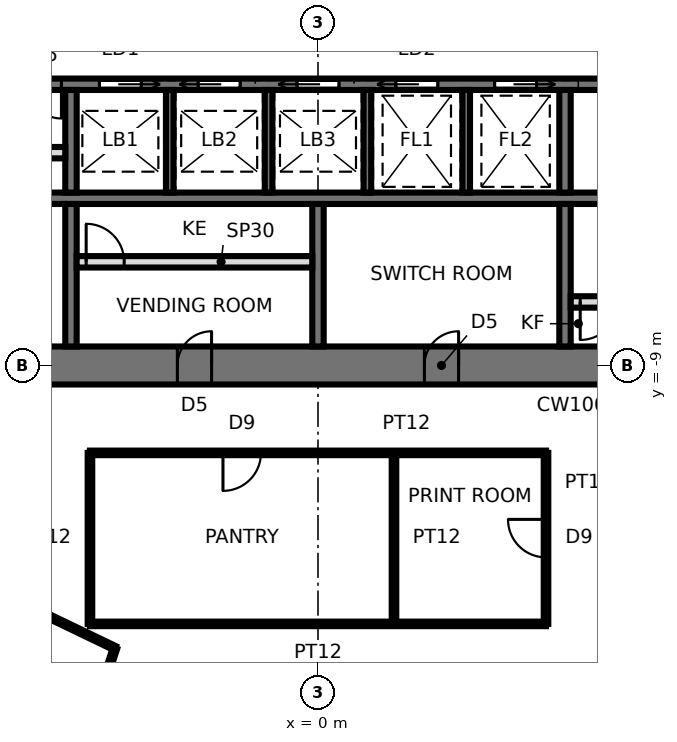
"""IFC4 building model, lengths in metres.
Left out: names, types, materials, properties, quantities, classifications, styles, units other than length and angle.
Written with IfcOpenShell. Run it as: python <this file> out.ifc"""

import sys

from ifc_helpers import new_model, si_unit, direction, frame, frame_2d, origin, place, context, subcontext, project, spatial, rectangle, extrude, element, fill, save


model = new_model("IFC4")
c1 = context("Model", 3, precision=1e-05, world=origin(), true_north=direction((0.0, 1.0)))
c2 = subcontext(c1, "Body", "Model", "MODEL_VIEW")
j1 = project(units=[si_unit("LENGTHUNIT", "METRE"), si_unit("PLANEANGLEUNIT", "RADIAN")], contexts=[c1])
p1 = place(None, origin())
s1 = spatial("IfcSite", under=j1, at=p1, CompositionType="ELEMENT")
p2 = place(p1, origin())
s2 = spatial("IfcBuilding", under=s1, at=p2, CompositionType="ELEMENT")
p3 = place(p2, frame((0.0, 0.0, 154.8)))
s3 = spatial("IfcBuildingStorey", under=s2, at=p3, CompositionType="ELEMENT", Elevation=154.8)
p4 = place(p3, frame((-13.2, -9.0, 0.0), z_axis=(0.0, 0.0, 1.0), x_axis=(1.0, 0.0, 0.0)))
e1 = element("IfcWall", 1, at=p4, inside=s3, PredefinedType="SHEAR", context=c2, shape_type="SweptSolid", body=[
    extrude(rectangle(XDim=26.4, YDim=1.0, at=frame_2d((13.2, 0.0))), origin(), (0.0, 0.0, 1.0), 3.9),
])
p5 = place(p4, frame((2.65, 0.0, 0.0)))
e2 = element("IfcOpeningElement", 2, at=p5, cuts=e1, PredefinedType="OPENING", context=c2, shape_type="SweptSolid", body=[
    extrude(rectangle(XDim=0.9, YDim=2.1, at=frame_2d((0.45, 1.05))), frame((0.0, 0.51, 0.0), z_axis=(0.0, -1.0, 0.0), x_axis=(1.0, 0.0, 0.0)), (0.0, 0.0, 1.0), 1.02),
])
p6 = place(p4, frame((9.5, 0.0, 0.0)))
e3 = element("IfcOpeningElement", 3, at=p6, cuts=e1, PredefinedType="OPENING", context=c2, shape_type="SweptSolid", body=[
    extrude(rectangle(XDim=0.9, YDim=2.1, at=frame_2d((0.45, 1.05))), frame((0.0, 0.51, 0.0), z_axis=(0.0, -1.0, 0.0), x_axis=(1.0, 0.0, 0.0)), (0.0, 0.0, 1.0), 1.02),
])
p7 = place(p4, frame((16.0, 0.0, 0.0)))
e4 = element("IfcOpeningElement", 4, at=p7, cuts=e1, PredefinedType="OPENING", context=c2, shape_type="SweptSolid", body=[
    extrude(rectangle(XDim=0.9, YDim=2.1, at=frame_2d((0.45, 1.05))), frame((0.0, 0.51, 0.0), z_axis=(0.0, -1.0, 0.0), x_axis=(1.0, 0.0, 0.0)), (0.0, 0.0, 1.0), 1.02),
])
p8 = place(p4, frame((22.85, 0.0, 0.0)))
e5 = element("IfcOpeningElement", 5, at=p8, cuts=e1, PredefinedType="OPENING", context=c2, shape_type="SweptSolid", body=[
    extrude(rectangle(XDim=0.9, YDim=2.1, at=frame_2d((0.45, 1.05))), frame((0.0, 0.51, 0.0), z_axis=(0.0, -1.0, 0.0), x_axis=(1.0, 0.0, 0.0)), (0.0, 0.0, 1.0), 1.02),
])
p9 = place(p3, frame((-13.2, -1.6, 0.0), z_axis=(0.0, 0.0, 1.0), x_axis=(1.0, 0.0, 0.0)))
e6 = element("IfcWall", 6, at=p9, inside=s3, PredefinedType="SHEAR", context=c2, shape_type="SweptSolid", body=[
    extrude(rectangle(XDim=26.4, YDim=0.3, at=frame_2d((13.2, 0.0))), origin(), (0.0, 0.0, 1.0), 3.9),
])
p10 = place(p9, frame((25.15, 0.0, 0.0)))
e7 = element("IfcOpeningElement", 7, at=p10, cuts=e6, PredefinedType="OPENING", context=c2, shape_type="SweptSolid", body=[
    extrude(rectangle(XDim=1.0, YDim=2.1, at=frame_2d((0.5, 1.05))), frame((0.0, 0.16, 0.0), z_axis=(0.0, -1.0, 0.0), x_axis=(1.0, 0.0, 0.0)), (0.0, 0.0, 1.0), 0.32),
])
p11 = place(p9, frame((7.45, 0.0, 0.0)))
e8 = element("IfcOpeningElement", 8, at=p11, cuts=e6, PredefinedType="OPENING", context=c2, shape_type="SweptSolid", body=[
    extrude(rectangle(XDim=1.1, YDim=2.3, at=frame_2d((0.55, 1.15))), frame((0.0, 0.16, 0.0), z_axis=(0.0, -1.0, 0.0), x_axis=(1.0, 0.0, 0.0)), (0.0, 0.0, 1.0), 0.32),
])
p12 = place(p9, frame((10.05, 0.0, 0.0)))
e9 = element("IfcOpeningElement", 9, at=p12, cuts=e6, PredefinedType="OPENING", context=c2, shape_type="SweptSolid", body=[
    extrude(rectangle(XDim=1.1, YDim=2.3, at=frame_2d((0.55, 1.15))), frame((0.0, 0.16, 0.0), z_axis=(0.0, -1.0, 0.0), x_axis=(1.0, 0.0, 0.0)), (0.0, 0.0, 1.0), 0.32),
])
p13 = place(p9, frame((12.65, 0.0, 0.0)))
e10 = element("IfcOpeningElement", 10, at=p13, cuts=e6, PredefinedType="OPENING", context=c2, shape_type="SweptSolid", body=[
    extrude(rectangle(XDim=1.1, YDim=2.3, at=frame_2d((0.55, 1.15))), frame((0.0, 0.16, 0.0), z_axis=(0.0, -1.0, 0.0), x_axis=(1.0, 0.0, 0.0)), (0.0, 0.0, 1.0), 0.32),
])
p14 = place(p9, frame((15.25, 0.0, 0.0)))
e11 = element("IfcOpeningElement", 11, at=p14, cuts=e6, PredefinedType="OPENING", context=c2, shape_type="SweptSolid", body=[
    extrude(rectangle(XDim=1.1, YDim=2.3, at=frame_2d((0.55, 1.15))), frame((0.0, 0.16, 0.0), z_axis=(0.0, -1.0, 0.0), x_axis=(1.0, 0.0, 0.0)), (0.0, 0.0, 1.0), 0.32),
])
p15 = place(p9, frame((17.85, 0.0, 0.0)))
e12 = element("IfcOpeningElement", 12, at=p15, cuts=e6, PredefinedType="OPENING", context=c2, shape_type="SweptSolid", body=[
    extrude(rectangle(XDim=1.1, YDim=2.3, at=frame_2d((0.55, 1.15))), frame((0.0, 0.16, 0.0), z_axis=(0.0, -1.0, 0.0), x_axis=(1.0, 0.0, 0.0)), (0.0, 0.0, 1.0), 0.32),
])
p16 = place(p9, frame((5.55, 0.0, 0.0)))
e13 = element("IfcOpeningElement", 13, at=p16, cuts=e6, PredefinedType="OPENING", context=c2, shape_type="SweptSolid", body=[
    extrude(rectangle(XDim=0.9, YDim=2.1, at=frame_2d((0.45, 1.05))), frame((0.0, 0.16, 0.0), z_axis=(0.0, -1.0, 0.0), x_axis=(1.0, 0.0, 0.0)), (0.0, 0.0, 1.0), 0.32),
])
p17 = place(p3, frame((-13.2, -4.6, 0.0), z_axis=(0.0, 0.0, 1.0), x_axis=(1.0, 0.0, 0.0)))
e14 = element("IfcWall", 14, at=p17, inside=s3, PredefinedType="SHEAR", context=c2, shape_type="SweptSolid", body=[
    extrude(rectangle(XDim=26.4, YDim=0.3, at=frame_2d((13.2, 0.0))), origin(), (0.0, 0.0, 1.0), 3.9),
])
p18 = place(p3, frame((-6.5, -1.75, 0.0), z_axis=(0.0, 0.0, 1.0), x_axis=(0.0, -1.0, 0.0)))
e15 = element("IfcWall", 15, at=p18, inside=s3, PredefinedType="SHEAR", context=c2, shape_type="SweptSolid", body=[
    extrude(rectangle(XDim=2.7, YDim=0.3, at=frame_2d((1.35, 0.0))), origin(), (0.0, 0.0, 1.0), 3.9),
])
p19 = place(p3, frame((-6.5, -4.75, 0.0), z_axis=(0.0, 0.0, 1.0), x_axis=(0.0, -1.0, 0.0)))
e16 = element("IfcWall", 16, at=p19, inside=s3, PredefinedType="SHEAR", context=c2, shape_type="SweptSolid", body=[
    extrude(rectangle(XDim=3.75, YDim=0.3, at=frame_2d((1.875, 0.0))), origin(), (0.0, 0.0, 1.0), 3.9),
])
p20 = place(p3, frame((6.5, -1.75, 0.0), z_axis=(0.0, 0.0, 1.0), x_axis=(0.0, -1.0, 0.0)))
e17 = element("IfcWall", 17, at=p20, inside=s3, PredefinedType="SHEAR", context=c2, shape_type="SweptSolid", body=[
    extrude(rectangle(XDim=2.7, YDim=0.3, at=frame_2d((1.35, 0.0))), origin(), (0.0, 0.0, 1.0), 3.9),
])
p21 = place(p3, frame((6.5, -4.75, 0.0), z_axis=(0.0, 0.0, 1.0), x_axis=(0.0, -1.0, 0.0)))
e18 = element("IfcWall", 18, at=p21, inside=s3, PredefinedType="SHEAR", context=c2, shape_type="SweptSolid", body=[
    extrude(rectangle(XDim=3.75, YDim=0.3, at=frame_2d((1.875, 0.0))), origin(), (0.0, 0.0, 1.0), 3.9),
])
for number, where, z_axis, x_axis in (
    (19, (-3.9, -1.75, 0.0), (0.0, 0.0, 1.0), (0.0, -1.0, 0.0)),
    (20, (-1.3, -1.75, 0.0), (0.0, 0.0, 1.0), (0.0, -1.0, 0.0)),
    (21, (1.3, -1.75, 0.0), (0.0, 0.0, 1.0), (0.0, -1.0, 0.0)),
    (22, (3.9, -1.75, 0.0), (0.0, 0.0, 1.0), (0.0, -1.0, 0.0)),
):
    element("IfcWall", number, at=place(p3, frame(where, z_axis=z_axis, x_axis=x_axis)), inside=s3, PredefinedType="SHEAR", context=c2, shape_type="SweptSolid", body=[
        extrude(rectangle(XDim=2.7, YDim=0.2, at=frame_2d((1.35, 0.0))), origin(), (0.0, 0.0, 1.0), 3.9),
    ])
p22 = place(p3, frame((0.0, -4.75, 0.0), z_axis=(0.0, 0.0, 1.0), x_axis=(0.0, -1.0, 0.0)))
e23 = element("IfcWall", 23, at=p22, inside=s3, PredefinedType="SHEAR", context=c2, shape_type="SweptSolid", body=[
    extrude(rectangle(XDim=3.75, YDim=0.3, at=frame_2d((1.875, 0.0))), origin(), (0.0, 0.0, 1.0), 3.9),
])
p23 = place(p3, frame((-6.35, -6.272, 0.0), z_axis=(0.0, 0.0, 1.0), x_axis=(1.0, 0.0, 0.0)))
e24 = element("IfcWall", 24, at=p23, inside=s3, PredefinedType="PARTITIONING", context=c2, shape_type="SweptSolid", body=[
    extrude(rectangle(XDim=6.2, YDim=0.3, at=frame_2d((3.1, 0.0))), origin(), (0.0, 0.0, 1.0), 3.74),
])
p24 = place(p23, frame((0.25, 0.0, 0.0)))
e25 = element("IfcOpeningElement", 25, at=p24, cuts=e24, PredefinedType="OPENING", context=c2, shape_type="SweptSolid", body=[
    extrude(rectangle(XDim=1.0, YDim=2.4, at=frame_2d((0.5, 1.2))), frame((0.0, 0.16, 0.0), z_axis=(0.0, -1.0, 0.0), x_axis=(1.0, 0.0, 0.0)), (0.0, 0.0, 1.0), 0.32),
])
p25 = place(p3, frame((6.65, -7.328, 0.0), z_axis=(0.0, 0.0, 1.0), x_axis=(1.0, 0.0, 0.0)))
e26 = element("IfcWall", 26, at=p25, inside=s3, PredefinedType="PARTITIONING", context=c2, shape_type="SweptSolid", body=[
    extrude(rectangle(XDim=6.55, YDim=0.3, at=frame_2d((3.275, 0.0))), origin(), (0.0, 0.0, 1.0), 3.74),
])
p26 = place(p25, frame((0.25, 0.0, 0.0)))
e27 = element("IfcOpeningElement", 27, at=p26, cuts=e26, PredefinedType="OPENING", context=c2, shape_type="SweptSolid", body=[
    extrude(rectangle(XDim=1.0, YDim=2.4, at=frame_2d((0.5, 1.2))), frame((0.0, 0.16, 0.0), z_axis=(0.0, -1.0, 0.0), x_axis=(1.0, 0.0, 0.0)), (0.0, 0.0, 1.0), 0.32),
])
p27 = place(p3, frame((-13.2, -3.4, 0.0), z_axis=(0.0, 0.0, 1.0), x_axis=(1.0, 0.0, 0.0)))
e28 = element("IfcWall", 28, at=p27, inside=s3, PredefinedType="SOLIDWALL", context=c2, shape_type="SweptSolid", body=[
    extrude(rectangle(XDim=6.55, YDim=0.3, at=frame_2d((3.275, 0.0))), origin(), (0.0, 0.0, 1.0), 3.74),
])
p28 = place(p27, frame((0.25, 0.0, 0.0)))
e29 = element("IfcOpeningElement", 29, at=p28, cuts=e28, PredefinedType="OPENING", context=c2, shape_type="SweptSolid", body=[
    extrude(rectangle(XDim=0.9, YDim=2.1, at=frame_2d((0.45, 1.05))), frame((0.0, 0.16, 0.0), z_axis=(0.0, -1.0, 0.0), x_axis=(1.0, 0.0, 0.0)), (0.0, 0.0, 1.0), 0.32),
])
p29 = place(p3, frame((-5.341, -16.439, 0.0), z_axis=(0.0, 0.0, 1.0), x_axis=(-0.901084159561, 0.43364425211, 0.0)))
e30 = element("IfcWall", 30, at=p29, inside=s3, PredefinedType="PARTITIONING", context=c2, shape_type="SweptSolid", body=[
    extrude(rectangle(XDim=7.325, YDim=0.12, at=frame_2d((3.663, 0.0))), origin(), (0.0, 0.0, 1.0), 3.74),
])
p30 = place(p29, frame((3.162, 0.0, 0.0)))
e31 = element("IfcOpeningElement", 31, at=p30, cuts=e30, PredefinedType="OPENING", context=c2, shape_type="SweptSolid", body=[
    extrude(rectangle(XDim=1.0, YDim=2.4, at=frame_2d((0.5, 1.2))), frame((0.0, 0.07, 0.0), z_axis=(0.0, -1.0, 0.0), x_axis=(1.0, 0.0, 0.0)), (0.0, 0.0, 1.0), 0.14),
])
p31 = place(p3, frame((-6.0, -15.8, 0.0), z_axis=(0.0, 0.0, 1.0), x_axis=(0.0, 1.0, 0.0)))
e32 = element("IfcWall", 32, at=p31, inside=s3, PredefinedType="PARTITIONING", context=c2, shape_type="SweptSolid", body=[
    extrude(rectangle(XDim=4.5, YDim=0.12, at=frame_2d((2.25, 0.0))), origin(), (0.0, 0.0, 1.0), 3.74),
])
p32 = place(p3, frame((-6.886, -21.194, 0.0), z_axis=(0.0, 0.0, 1.0), x_axis=(0.309040803421, 0.951048779938, 0.0)))
e33 = element("IfcWall", 33, at=p32, inside=s3, PredefinedType="PARTITIONING", context=c2, shape_type="SweptSolid", body=[
    extrude(rectangle(XDim=5.0, YDim=0.12, at=frame_2d((2.5, 0.0))), origin(), (0.0, 0.0, 1.0), 2.94),
])
p33 = place(p3, frame((-6.0, -11.3, 0.0), z_axis=(0.0, 0.0, 1.0), x_axis=(1.0, 0.0, 0.0)))
e34 = element("IfcWall", 34, at=p33, inside=s3, PredefinedType="PARTITIONING", context=c2, shape_type="SweptSolid", body=[
    extrude(rectangle(XDim=12.0, YDim=0.12, at=frame_2d((6.0, 0.0))), origin(), (0.0, 0.0, 1.0), 3.74),
])
p34 = place(p33, frame((3.5, 0.0, 0.0)))
e35 = element("IfcOpeningElement", 35, at=p34, cuts=e34, PredefinedType="OPENING", context=c2, shape_type="SweptSolid", body=[
    extrude(rectangle(XDim=1.0, YDim=2.4, at=frame_2d((0.5, 1.2))), frame((0.0, 0.07, 0.0), z_axis=(0.0, -1.0, 0.0), x_axis=(1.0, 0.0, 0.0)), (0.0, 0.0, 1.0), 0.14),
])
p35 = place(p3, frame((6.0, -15.8, 0.0), z_axis=(0.0, 0.0, 1.0), x_axis=(-1.0, 0.0, 0.0)))
e36 = element("IfcWall", 36, at=p35, inside=s3, PredefinedType="PARTITIONING", context=c2, shape_type="SweptSolid", body=[
    extrude(rectangle(XDim=12.0, YDim=0.12, at=frame_2d((6.0, 0.0))), origin(), (0.0, 0.0, 1.0), 3.286),
])
p36 = place(p3, frame((2.0, -11.3, 0.0), z_axis=(0.0, 0.0, 1.0), x_axis=(0.0, -1.0, 0.0)))
e37 = element("IfcWall", 37, at=p36, inside=s3, PredefinedType="PARTITIONING", context=c2, shape_type="SweptSolid", body=[
    extrude(rectangle(XDim=4.5, YDim=0.12, at=frame_2d((2.25, 0.0))), origin(), (0.0, 0.0, 1.0), 3.74),
])
p37 = place(p3, frame((6.0, -11.3, 0.0), z_axis=(0.0, 0.0, 1.0), x_axis=(0.0, -1.0, 0.0)))
e38 = element("IfcWall", 38, at=p37, inside=s3, PredefinedType="PARTITIONING", context=c2, shape_type="SweptSolid", body=[
    extrude(rectangle(XDim=4.5, YDim=0.12, at=frame_2d((2.25, 0.0))), origin(), (0.0, 0.0, 1.0), 3.74),
])
p38 = place(p37, frame((1.75, 0.0, 0.0)))
e39 = element("IfcOpeningElement", 39, at=p38, cuts=e38, PredefinedType="OPENING", context=c2, shape_type="SweptSolid", body=[
    extrude(rectangle(XDim=1.0, YDim=2.4, at=frame_2d((0.5, 1.2))), frame((0.0, 0.07, 0.0), z_axis=(0.0, -1.0, 0.0), x_axis=(1.0, 0.0, 0.0)), (0.0, 0.0, 1.0), 0.14),
])
p39 = place(p11, frame((1.1, 0.0, 0.0), z_axis=(0.0, 0.0, 1.0), x_axis=(-1.0, 0.0, 0.0)))
e40 = element("IfcDoor", 40, at=p39, inside=s3, OperationType="SLIDING_TO_LEFT", PredefinedType="DOOR", context=c2, shape_type="SweptSolid", body=[
    extrude(rectangle(XDim=1.1, YDim=2.3, at=frame_2d((0.55, 1.15))), frame((0.0, 0.025, 0.0), z_axis=(0.0, -1.0, 0.0), x_axis=(1.0, 0.0, 0.0)), (0.0, 0.0, 1.0), 0.05),
])
fill(e8, e40)
p40 = place(p12, frame((1.1, 0.0, 0.0), z_axis=(0.0, 0.0, 1.0), x_axis=(-1.0, 0.0, 0.0)))
e41 = element("IfcDoor", 41, at=p40, inside=s3, OperationType="SLIDING_TO_RIGHT", PredefinedType="DOOR", context=c2, shape_type="SweptSolid", body=[
    extrude(rectangle(XDim=1.1, YDim=2.3, at=frame_2d((0.55, 1.15))), frame((0.0, 0.025, 0.0), z_axis=(0.0, -1.0, 0.0), x_axis=(1.0, 0.0, 0.0)), (0.0, 0.0, 1.0), 0.05),
])
fill(e9, e41)
p41 = place(p13, frame((1.1, 0.0, 0.0), z_axis=(0.0, 0.0, 1.0), x_axis=(-1.0, 0.0, 0.0)))
e42 = element("IfcDoor", 42, at=p41, inside=s3, OperationType="SLIDING_TO_RIGHT", PredefinedType="DOOR", context=c2, shape_type="SweptSolid", body=[
    extrude(rectangle(XDim=1.1, YDim=2.3, at=frame_2d((0.55, 1.15))), frame((0.0, 0.025, 0.0), z_axis=(0.0, -1.0, 0.0), x_axis=(1.0, 0.0, 0.0)), (0.0, 0.0, 1.0), 0.05),
])
fill(e10, e42)
p42 = place(p14, frame((1.1, 0.0, 0.0), z_axis=(0.0, 0.0, 1.0), x_axis=(-1.0, 0.0, 0.0)))
e43 = element("IfcDoor", 43, at=p42, inside=s3, OperationType="SLIDING_TO_RIGHT", PredefinedType="DOOR", context=c2, shape_type="SweptSolid", body=[
    extrude(rectangle(XDim=1.1, YDim=2.3, at=frame_2d((0.55, 1.15))), frame((0.0, 0.025, 0.0), z_axis=(0.0, -1.0, 0.0), x_axis=(1.0, 0.0, 0.0)), (0.0, 0.0, 1.0), 0.05),
])
fill(e11, e43)
p43 = place(p15, frame((1.1, 0.0, 0.0), z_axis=(0.0, 0.0, 1.0), x_axis=(-1.0, 0.0, 0.0)))
e44 = element("IfcDoor", 44, at=p43, inside=s3, OperationType="SLIDING_TO_LEFT", PredefinedType="DOOR", context=c2, shape_type="SweptSolid", body=[
    extrude(rectangle(XDim=1.1, YDim=2.3, at=frame_2d((0.55, 1.15))), frame((0.0, 0.025, 0.0), z_axis=(0.0, -1.0, 0.0), x_axis=(1.0, 0.0, 0.0)), (0.0, 0.0, 1.0), 0.05),
])
fill(e12, e44)
p44 = place(p16, frame((0.9, 0.0, 0.0), z_axis=(0.0, 0.0, 1.0), x_axis=(-1.0, 0.0, 0.0)))
e45 = element("IfcDoor", 45, at=p44, inside=s3, OperationType="SINGLE_SWING_LEFT", PredefinedType="DOOR", context=c2, shape_type="SweptSolid", body=[
    extrude(rectangle(XDim=0.9, YDim=2.1, at=frame_2d((0.45, 1.05))), frame((0.0, 0.025, 0.0), z_axis=(0.0, -1.0, 0.0), x_axis=(1.0, 0.0, 0.0)), (0.0, 0.0, 1.0), 0.05),
])
fill(e13, e45)
p45 = place(p6, origin())
e46 = element("IfcDoor", 46, at=p45, inside=s3, OperationType="SINGLE_SWING_RIGHT", PredefinedType="DOOR", context=c2, shape_type="SweptSolid", body=[
    extrude(rectangle(XDim=0.82, YDim=2.06, at=frame_2d((0.45, 1.03))), frame((0.0, 0.025, 0.0), z_axis=(0.0, -1.0, 0.0), x_axis=(1.0, 0.0, 0.0)), (0.0, 0.0, 1.0), 0.05),
    extrude(rectangle(XDim=0.04, YDim=2.1, at=frame_2d((0.02, 1.05))), frame((0.0, 0.25, 0.0), z_axis=(0.0, -1.0, 0.0), x_axis=(1.0, 0.0, 0.0)), (0.0, 0.0, 1.0), 0.5),
    extrude(rectangle(XDim=0.04, YDim=2.1, at=frame_2d((0.88, 1.05))), frame((0.0, 0.25, 0.0), z_axis=(0.0, -1.0, 0.0), x_axis=(1.0, 0.0, 0.0)), (0.0, 0.0, 1.0), 0.5),
    extrude(rectangle(XDim=0.82, YDim=0.04, at=frame_2d((0.45, 2.08))), frame((0.0, 0.25, 0.0), z_axis=(0.0, -1.0, 0.0), x_axis=(1.0, 0.0, 0.0)), (0.0, 0.0, 1.0), 0.5),
])
fill(e3, e46)
p46 = place(p7, origin())
e47 = element("IfcDoor", 47, at=p46, inside=s3, OperationType="SINGLE_SWING_RIGHT", PredefinedType="DOOR", context=c2, shape_type="SweptSolid", body=[
    extrude(rectangle(XDim=0.82, YDim=2.06, at=frame_2d((0.45, 1.03))), frame((0.0, 0.025, 0.0), z_axis=(0.0, -1.0, 0.0), x_axis=(1.0, 0.0, 0.0)), (0.0, 0.0, 1.0), 0.05),
    extrude(rectangle(XDim=0.04, YDim=2.1, at=frame_2d((0.02, 1.05))), frame((0.0, 0.25, 0.0), z_axis=(0.0, -1.0, 0.0), x_axis=(1.0, 0.0, 0.0)), (0.0, 0.0, 1.0), 0.5),
    extrude(rectangle(XDim=0.04, YDim=2.1, at=frame_2d((0.88, 1.05))), frame((0.0, 0.25, 0.0), z_axis=(0.0, -1.0, 0.0), x_axis=(1.0, 0.0, 0.0)), (0.0, 0.0, 1.0), 0.5),
    extrude(rectangle(XDim=0.82, YDim=0.04, at=frame_2d((0.45, 2.08))), frame((0.0, 0.25, 0.0), z_axis=(0.0, -1.0, 0.0), x_axis=(1.0, 0.0, 0.0)), (0.0, 0.0, 1.0), 0.5),
])
fill(e4, e47)
p47 = place(p24, origin())
e48 = element("IfcDoor", 48, at=p47, inside=s3, OperationType="SINGLE_SWING_LEFT", PredefinedType="DOOR", context=c2, shape_type="SweptSolid", body=[
    extrude(rectangle(XDim=1.0, YDim=2.4, at=frame_2d((0.5, 1.2))), frame((0.0, 0.025, 0.0), z_axis=(0.0, -1.0, 0.0), x_axis=(1.0, 0.0, 0.0)), (0.0, 0.0, 1.0), 0.05),
])
fill(e25, e48)
p48 = place(p26, frame((1.0, 0.0, 0.0), z_axis=(0.0, 0.0, 1.0), x_axis=(-1.0, 0.0, 0.0)))
e49 = element("IfcDoor", 49, at=p48, inside=s3, OperationType="SINGLE_SWING_RIGHT", PredefinedType="DOOR", context=c2, shape_type="SweptSolid", body=[
    extrude(rectangle(XDim=1.0, YDim=2.4, at=frame_2d((0.5, 1.2))), frame((0.0, 0.025, 0.0), z_axis=(0.0, -1.0, 0.0), x_axis=(1.0, 0.0, 0.0)), (0.0, 0.0, 1.0), 0.05),
])
fill(e27, e49)
p49 = place(p34, frame((1.0, 0.0, 0.0), z_axis=(0.0, 0.0, 1.0), x_axis=(-1.0, 0.0, 0.0)))
e50 = element("IfcDoor", 50, at=p49, inside=s3, OperationType="SINGLE_SWING_RIGHT", PredefinedType="DOOR", context=c2, shape_type="SweptSolid", body=[
    extrude(rectangle(XDim=1.0, YDim=2.4, at=frame_2d((0.5, 1.2))), frame((0.0, 0.025, 0.0), z_axis=(0.0, -1.0, 0.0), x_axis=(1.0, 0.0, 0.0)), (0.0, 0.0, 1.0), 0.05),
])
fill(e35, e50)
p50 = place(p38, frame((1.0, 0.0, 0.0), z_axis=(0.0, 0.0, 1.0), x_axis=(-1.0, 0.0, 0.0)))
e51 = element("IfcDoor", 51, at=p50, inside=s3, OperationType="SINGLE_SWING_RIGHT", PredefinedType="DOOR", context=c2, shape_type="SweptSolid", body=[
    extrude(rectangle(XDim=1.0, YDim=2.4, at=frame_2d((0.5, 1.2))), frame((0.0, 0.025, 0.0), z_axis=(0.0, -1.0, 0.0), x_axis=(1.0, 0.0, 0.0)), (0.0, 0.0, 1.0), 0.05),
])
fill(e39, e51)
save(model, sys.argv[1])
